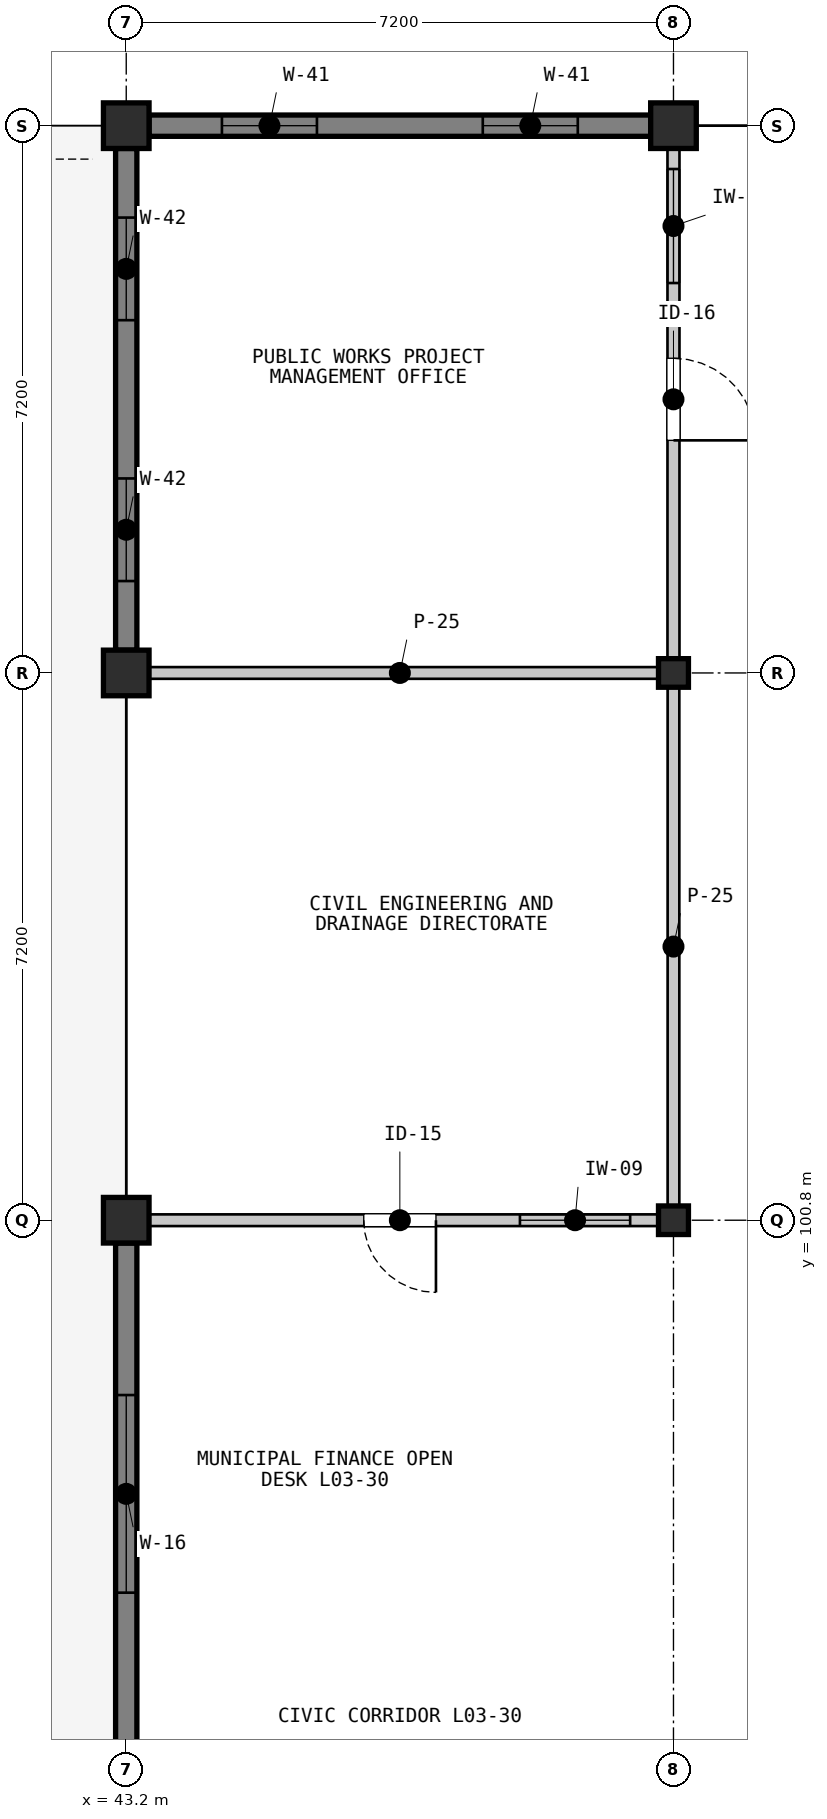
"""IFC4 building model, lengths in metres.
Left out: names, types, materials, properties, quantities, classifications, styles, units other than length and angle.
Written with IfcOpenShell. Run it as: python <this file> out.ifc"""

import sys

from ifc_helpers import new_model, si_unit, direction, frame, frame_2d, origin, origin_2d, place, context, subcontext, project, spatial, rectangle, i_section, extrude, element, fill, save


model = new_model("IFC4")
c1 = context("Model", 3, precision=1e-05, world=origin(), true_north=direction((0.0, 1.0)))
c2 = subcontext(c1, "Body", "Model", "MODEL_VIEW")
j1 = project(units=[si_unit("LENGTHUNIT", "METRE"), si_unit("PLANEANGLEUNIT", "RADIAN")], contexts=[c1])
p1 = place(None, origin())
s1 = spatial("IfcSite", under=j1, at=p1, CompositionType="ELEMENT")
p2 = place(p1, origin())
s2 = spatial("IfcBuilding", under=s1, at=p2, CompositionType="ELEMENT")
p3 = place(p2, frame((0.0, 0.0, 9.9)))
s3 = spatial("IfcBuildingStorey", under=s2, at=p3, CompositionType="ELEMENT", Elevation=9.9)
for number, where, z_axis, x_axis in (
    (1, (43.2, 100.8, 0.0), (0.0, 0.0, 1.0), (1.0, 0.0, 0.0)),
    (2, (43.2, 108.0, 0.0), (0.0, 0.0, 1.0), (1.0, 0.0, 0.0)),
    (3, (43.2, 115.2, 0.0), (0.0, 0.0, 1.0), (1.0, 0.0, 0.0)),
):
    element("IfcColumn", number, at=place(p3, frame(where, z_axis=z_axis, x_axis=x_axis)), inside=s3, PredefinedType="COLUMN", context=c2, shape_type="SweptSolid", body=[
        extrude(rectangle(XDim=0.6, YDim=0.6, at=origin_2d()), origin(), (0.0, 0.0, 1.0), 4.2),
    ])
for number, where, z_axis, x_axis in (
    (4, (50.4, 100.8, 0.0), (0.0, 0.0, 1.0), (1.0, 0.0, 0.0)),
    (5, (50.4, 108.0, 0.0), (0.0, 0.0, 1.0), (1.0, 0.0, 0.0)),
):
    element("IfcColumn", number, at=place(p3, frame(where, z_axis=z_axis, x_axis=x_axis)), inside=s3, PredefinedType="COLUMN", context=c2, shape_type="SweptSolid", body=[
        extrude(i_section(OverallWidth=0.394, OverallDepth=0.376, WebThickness=0.017, FlangeThickness=0.028, FilletRadius=0.015, at=origin_2d()), origin(), (0.0, 0.0, 1.0), 4.2),
    ])
p4 = place(p3, frame((50.4, 115.2, 0.0), z_axis=(0.0, 0.0, 1.0), x_axis=(1.0, 0.0, 0.0)))
e6 = element("IfcColumn", 6, at=p4, inside=s3, PredefinedType="COLUMN", context=c2, shape_type="SweptSolid", body=[
    extrude(rectangle(XDim=0.6, YDim=0.6, at=origin_2d()), origin(), (0.0, 0.0, 1.0), 4.2),
])
p5 = place(p3, frame((43.2, 93.9, 0.0), z_axis=(0.0, 0.0, 1.0), x_axis=(0.0, 1.0, 0.0)))
e7 = element("IfcWall", 7, at=p5, inside=s3, PredefinedType="SOLIDWALL", context=c2, shape_type="SweptSolid", body=[
    extrude(rectangle(XDim=6.6, YDim=0.28, at=frame_2d((3.3, 0.0))), origin(), (0.0, 0.0, 1.0), 3.487),
])
p6 = place(p5, frame((2.0, 0.0, 0.95)))
e8 = element("IfcOpeningElement", 8, at=p6, cuts=e7, PredefinedType="OPENING", context=c2, shape_type="SweptSolid", body=[
    extrude(rectangle(XDim=2.6, YDim=1.9, at=frame_2d((1.3, 0.95))), frame((0.0, 0.15, 0.0), z_axis=(0.0, -1.0, 0.0), x_axis=(1.0, 0.0, 0.0)), (0.0, 0.0, 1.0), 0.3),
])
p7 = place(p3, frame((43.5, 115.2, 0.0), z_axis=(0.0, 0.0, 1.0), x_axis=(1.0, 0.0, 0.0)))
e9 = element("IfcWall", 9, at=p7, inside=s3, PredefinedType="SOLIDWALL", context=c2, shape_type="SweptSolid", body=[
    extrude(rectangle(XDim=6.6, YDim=0.28, at=frame_2d((3.3, 0.0))), origin(), (0.0, 0.0, 1.0), 3.418),
])
p8 = place(p7, frame((0.959, 0.0, 0.95)))
e10 = element("IfcOpeningElement", 10, at=p8, cuts=e9, PredefinedType="OPENING", context=c2, shape_type="SweptSolid", body=[
    extrude(rectangle(XDim=1.25, YDim=1.85, at=frame_2d((0.625, 0.925))), frame((0.0, 0.15, 0.0), z_axis=(0.0, -1.0, 0.0), x_axis=(1.0, 0.0, 0.0)), (0.0, 0.0, 1.0), 0.3),
])
p9 = place(p7, frame((4.391, 0.0, 0.95)))
e11 = element("IfcOpeningElement", 11, at=p9, cuts=e9, PredefinedType="OPENING", context=c2, shape_type="SweptSolid", body=[
    extrude(rectangle(XDim=1.25, YDim=1.85, at=frame_2d((0.625, 0.925))), frame((0.0, 0.15, 0.0), z_axis=(0.0, -1.0, 0.0), x_axis=(1.0, 0.0, 0.0)), (0.0, 0.0, 1.0), 0.3),
])
p10 = place(p3, frame((43.2, 108.3, 0.0), z_axis=(0.0, 0.0, 1.0), x_axis=(0.0, 1.0, 0.0)))
e12 = element("IfcWall", 12, at=p10, inside=s3, PredefinedType="SOLIDWALL", context=c2, shape_type="SweptSolid", body=[
    extrude(rectangle(XDim=6.6, YDim=0.28, at=frame_2d((3.3, 0.0))), origin(), (0.0, 0.0, 1.0), 3.487),
])
p11 = place(p10, frame((0.909, 0.0, 0.95)))
e13 = element("IfcOpeningElement", 13, at=p11, cuts=e12, PredefinedType="OPENING", context=c2, shape_type="SweptSolid", body=[
    extrude(rectangle(XDim=1.35, YDim=1.85, at=frame_2d((0.675, 0.925))), frame((0.0, 0.15, 0.0), z_axis=(0.0, -1.0, 0.0), x_axis=(1.0, 0.0, 0.0)), (0.0, 0.0, 1.0), 0.3),
])
p12 = place(p10, frame((4.341, 0.0, 0.95)))
e14 = element("IfcOpeningElement", 14, at=p12, cuts=e12, PredefinedType="OPENING", context=c2, shape_type="SweptSolid", body=[
    extrude(rectangle(XDim=1.35, YDim=1.85, at=frame_2d((0.675, 0.925))), frame((0.0, 0.15, 0.0), z_axis=(0.0, -1.0, 0.0), x_axis=(1.0, 0.0, 0.0)), (0.0, 0.0, 1.0), 0.3),
])
p13 = place(p3, frame((50.28, 100.8, 0.0), z_axis=(0.0, 0.0, 1.0), x_axis=(-1.0, 0.0, 0.0)))
e15 = element("IfcWall", 15, at=p13, inside=s3, PredefinedType="PARTITIONING", context=c2, shape_type="SweptSolid", body=[
    extrude(rectangle(XDim=6.96, YDim=0.154, at=frame_2d((3.48, 0.0))), origin(), (0.0, 0.0, 1.0), 3.408),
])
p14 = place(p13, frame((3.005, 0.0, 0.0)))
e16 = element("IfcOpeningElement", 16, at=p14, cuts=e15, PredefinedType="OPENING", context=c2, shape_type="SweptSolid", body=[
    extrude(rectangle(XDim=0.95, YDim=2.15, at=frame_2d((0.475, 1.075))), frame((0.0, 0.087, 0.0), z_axis=(0.0, -1.0, 0.0), x_axis=(1.0, 0.0, 0.0)), (0.0, 0.0, 1.0), 0.174),
])
p15 = place(p13, frame((0.45, 0.0, 1.05)))
e17 = element("IfcOpeningElement", 17, at=p15, cuts=e15, PredefinedType="OPENING", context=c2, shape_type="SweptSolid", body=[
    extrude(rectangle(XDim=1.45, YDim=1.15, at=frame_2d((0.725, 0.575))), frame((0.0, 0.087, 0.0), z_axis=(0.0, -1.0, 0.0), x_axis=(1.0, 0.0, 0.0)), (0.0, 0.0, 1.0), 0.174),
])
for number, where, z_axis, x_axis in (
    (18, (43.32, 108.0, 0.0), (0.0, 0.0, 1.0), (1.0, 0.0, 0.0)),
    (19, (50.4, 107.88, 0.0), (0.0, 0.0, 1.0), (0.0, -1.0, 0.0)),
):
    element("IfcWall", number, at=place(p3, frame(where, z_axis=z_axis, x_axis=x_axis)), inside=s3, PredefinedType="PARTITIONING", context=c2, shape_type="SweptSolid", body=[
        extrude(rectangle(XDim=6.96, YDim=0.154, at=frame_2d((3.48, 0.0))), origin(), (0.0, 0.0, 1.0), 3.408),
    ])
p16 = place(p3, frame((50.4, 115.08, 0.0), z_axis=(0.0, 0.0, 1.0), x_axis=(0.0, -1.0, 0.0)))
e20 = element("IfcWall", 20, at=p16, inside=s3, PredefinedType="PARTITIONING", context=c2, shape_type="SweptSolid", body=[
    extrude(rectangle(XDim=6.96, YDim=0.158, at=frame_2d((3.48, 0.0))), origin(), (0.0, 0.0, 1.0), 3.408),
])
p17 = place(p16, frame((2.94, 0.0, 0.0)))
e21 = element("IfcOpeningElement", 21, at=p17, cuts=e20, PredefinedType="OPENING", context=c2, shape_type="SweptSolid", body=[
    extrude(rectangle(XDim=1.08, YDim=2.2, at=frame_2d((0.54, 1.1))), frame((0.0, 0.089, 0.0), z_axis=(0.0, -1.0, 0.0), x_axis=(1.0, 0.0, 0.0)), (0.0, 0.0, 1.0), 0.178),
])
p18 = place(p16, frame((0.45, 0.0, 1.05)))
e22 = element("IfcOpeningElement", 22, at=p18, cuts=e20, PredefinedType="OPENING", context=c2, shape_type="SweptSolid", body=[
    extrude(rectangle(XDim=1.5, YDim=1.15, at=frame_2d((0.75, 0.575))), frame((0.0, 0.089, 0.0), z_axis=(0.0, -1.0, 0.0), x_axis=(1.0, 0.0, 0.0)), (0.0, 0.0, 1.0), 0.178),
])
p19 = place(p6, origin())
e23 = element("IfcWindow", 23, at=p19, inside=s3, PartitioningType="SINGLE_PANEL", PredefinedType="WINDOW", context=c2, shape_type="SweptSolid", body=[
    extrude(rectangle(XDim=2.6, YDim=1.9, at=frame_2d((1.3, 0.95))), frame((0.0, 0.03, 0.0), z_axis=(0.0, -1.0, 0.0), x_axis=(1.0, 0.0, 0.0)), (0.0, 0.0, 1.0), 0.06),
])
fill(e8, e23)
p20 = place(p8, origin())
e24 = element("IfcWindow", 24, at=p20, inside=s3, PartitioningType="SINGLE_PANEL", PredefinedType="WINDOW", context=c2, shape_type="SweptSolid", body=[
    extrude(rectangle(XDim=1.25, YDim=1.85, at=frame_2d((0.625, 0.925))), frame((0.0, 0.03, 0.0), z_axis=(0.0, -1.0, 0.0), x_axis=(1.0, 0.0, 0.0)), (0.0, 0.0, 1.0), 0.06),
])
fill(e10, e24)
p21 = place(p9, origin())
e25 = element("IfcWindow", 25, at=p21, inside=s3, PartitioningType="SINGLE_PANEL", PredefinedType="WINDOW", context=c2, shape_type="SweptSolid", body=[
    extrude(rectangle(XDim=1.25, YDim=1.85, at=frame_2d((0.625, 0.925))), frame((0.0, 0.03, 0.0), z_axis=(0.0, -1.0, 0.0), x_axis=(1.0, 0.0, 0.0)), (0.0, 0.0, 1.0), 0.06),
])
fill(e11, e25)
p22 = place(p11, origin())
e26 = element("IfcWindow", 26, at=p22, inside=s3, PartitioningType="SINGLE_PANEL", PredefinedType="WINDOW", context=c2, shape_type="SweptSolid", body=[
    extrude(rectangle(XDim=1.35, YDim=1.85, at=frame_2d((0.675, 0.925))), frame((0.0, 0.03, 0.0), z_axis=(0.0, -1.0, 0.0), x_axis=(1.0, 0.0, 0.0)), (0.0, 0.0, 1.0), 0.06),
])
fill(e13, e26)
p23 = place(p12, origin())
e27 = element("IfcWindow", 27, at=p23, inside=s3, PartitioningType="SINGLE_PANEL", PredefinedType="WINDOW", context=c2, shape_type="SweptSolid", body=[
    extrude(rectangle(XDim=1.35, YDim=1.85, at=frame_2d((0.675, 0.925))), frame((0.0, 0.03, 0.0), z_axis=(0.0, -1.0, 0.0), x_axis=(1.0, 0.0, 0.0)), (0.0, 0.0, 1.0), 0.06),
])
fill(e14, e27)
p24 = place(p14, origin())
e28 = element("IfcDoor", 28, at=p24, inside=s3, OperationType="SINGLE_SWING_LEFT", PredefinedType="DOOR", context=c2, shape_type="SweptSolid", body=[
    extrude(rectangle(XDim=0.95, YDim=2.15, at=frame_2d((0.475, 1.075))), frame((0.0, 0.025, 0.0), z_axis=(0.0, -1.0, 0.0), x_axis=(1.0, 0.0, 0.0)), (0.0, 0.0, 1.0), 0.05),
])
fill(e16, e28)
p25 = place(p15, origin())
e29 = element("IfcWindow", 29, at=p25, inside=s3, PartitioningType="SINGLE_PANEL", PredefinedType="WINDOW", context=c2, shape_type="SweptSolid", body=[
    extrude(rectangle(XDim=1.45, YDim=1.15, at=frame_2d((0.725, 0.575))), frame((0.0, 0.03, 0.0), z_axis=(0.0, -1.0, 0.0), x_axis=(1.0, 0.0, 0.0)), (0.0, 0.0, 1.0), 0.06),
])
fill(e17, e29)
p26 = place(p17, origin())
e30 = element("IfcDoor", 30, at=p26, inside=s3, OperationType="SINGLE_SWING_RIGHT", PredefinedType="DOOR", context=c2, shape_type="SweptSolid", body=[
    extrude(rectangle(XDim=1.08, YDim=2.2, at=frame_2d((0.54, 1.1))), frame((0.0, 0.025, 0.0), z_axis=(0.0, -1.0, 0.0), x_axis=(1.0, 0.0, 0.0)), (0.0, 0.0, 1.0), 0.05),
])
fill(e21, e30)
p27 = place(p18, origin())
e31 = element("IfcWindow", 31, at=p27, inside=s3, PartitioningType="SINGLE_PANEL", PredefinedType="WINDOW", context=c2, shape_type="SweptSolid", body=[
    extrude(rectangle(XDim=1.5, YDim=1.15, at=frame_2d((0.75, 0.575))), frame((0.0, 0.03, 0.0), z_axis=(0.0, -1.0, 0.0), x_axis=(1.0, 0.0, 0.0)), (0.0, 0.0, 1.0), 0.06),
])
fill(e22, e31)
save(model, sys.argv[1])
